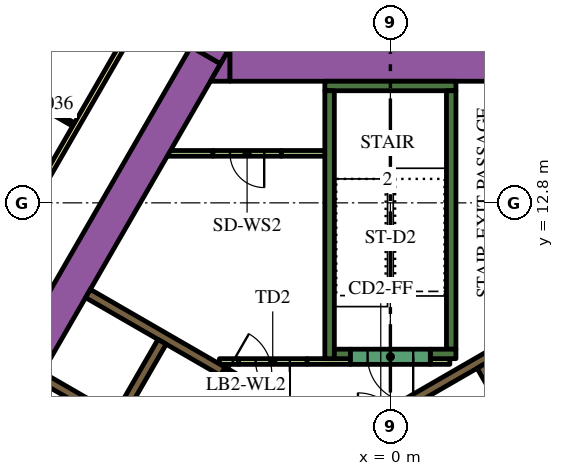
"""IFC4 building model, lengths in metres.
Left out: names, types, materials, properties, quantities, classifications, styles, units other than length and angle.
Written with IfcOpenShell. Run it as: python <this file> out.ifc"""

import sys

from ifc_helpers import new_model, si_unit, direction, frame, frame_2d, origin, place, context, subcontext, project, spatial, polyline, rectangle, outline, extrude, element, fill, save


model = new_model("IFC4")
c1 = context("Model", 3, precision=1e-05, world=origin(), true_north=direction((0.0, 1.0)))
c2 = subcontext(c1, "Body", "Model", "MODEL_VIEW")
j1 = project(units=[si_unit("LENGTHUNIT", "METRE"), si_unit("PLANEANGLEUNIT", "RADIAN")], contexts=[c1])
p1 = place(None, origin())
s1 = spatial("IfcSite", under=j1, at=p1, CompositionType="ELEMENT")
p2 = place(p1, origin())
s2 = spatial("IfcBuilding", under=s1, at=p2, CompositionType="ELEMENT")
p3 = place(p2, frame((0.0, 0.0, 66.6)))
s3 = spatial("IfcBuildingStorey", under=s2, at=p3, CompositionType="ELEMENT", Elevation=66.6)
p4 = place(p3, frame((-15.36, -1.503, 0.0), z_axis=(0.0, 0.0, 1.0), x_axis=(0.50000389221, 0.866023156604, 0.0)))
e1 = element("IfcWall", 1, at=p4, inside=s3, PredefinedType="SOLIDWALL", context=c2, shape_type="SweptSolid", body=[
    extrude(rectangle(XDim=21.0, YDim=0.9, at=frame_2d((10.5, 0.0))), origin(), (0.0, 0.0, 1.0), 3.9),
])
p5 = place(p3, origin())
e2 = element("IfcWall", 2, at=p5, inside=s3, PredefinedType="SOLIDWALL", context=c2, shape_type="SweptSolid", body=[
    extrude(outline(polyline([(-4.215, 16.9), (-4.469, 16.46), (-5.231, 16.9), (-4.215, 16.9)])), origin(), (0.0, 0.0, 1.0), 3.9),
])
p6 = place(p3, frame((-4.224, 16.45, 0.0), z_axis=(0.0, 0.0, 1.0), x_axis=(1.0, 0.0, 0.0)))
e3 = element("IfcWall", 3, at=p6, inside=s3, PredefinedType="SOLIDWALL", context=c2, shape_type="SweptSolid", body=[
    extrude(rectangle(XDim=9.488, YDim=0.9, at=frame_2d((4.744, 0.0))), origin(), (0.0, 0.0, 1.0), 3.9),
])
e4 = element("IfcWall", 4, at=p5, inside=s3, PredefinedType="SOLIDWALL", context=c2, shape_type="SweptSolid", body=[
    extrude(outline(polyline([(-4.734, 16.0), (-4.226, 16.88), (-4.226, 16.0), (-4.734, 16.0)])), origin(), (0.0, 0.0, 1.0), 3.9),
])
p7 = place(p3, frame((-1.725, 15.875, 0.0), z_axis=(0.0, 0.0, 1.0), x_axis=(1.0, 0.0, 0.0)))
e5 = element("IfcWall", 5, at=p7, inside=s3, PredefinedType="SOLIDWALL", context=c2, shape_type="SweptSolid", body=[
    extrude(rectangle(XDim=3.45, YDim=0.25, at=frame_2d((1.725, 0.0))), origin(), (0.0, 0.0, 1.0), 3.9),
])
p8 = place(p3, frame((1.6, 8.95, 0.0), z_axis=(0.0, 0.0, 1.0), x_axis=(0.0, 1.0, 0.0)))
e6 = element("IfcWall", 6, at=p8, inside=s3, PredefinedType="SOLIDWALL", context=c2, shape_type="SweptSolid", body=[
    extrude(rectangle(XDim=6.8, YDim=0.25, at=frame_2d((3.4, 0.0))), origin(), (0.0, 0.0, 1.0), 3.9),
])
p9 = place(p3, frame((1.05, 8.825, 0.0), z_axis=(0.0, 0.0, 1.0), x_axis=(1.0, 0.0, 0.0)))
e7 = element("IfcWall", 7, at=p9, inside=s3, PredefinedType="SOLIDWALL", context=c2, shape_type="SweptSolid", body=[
    extrude(rectangle(XDim=0.675, YDim=0.25, at=frame_2d((0.337, 0.0))), origin(), (0.0, 0.0, 1.0), 3.9),
])
p10 = place(p3, frame((-1.6, 8.7, 0.0), z_axis=(0.0, 0.0, 1.0), x_axis=(0.0, 1.0, 0.0)))
e8 = element("IfcWall", 8, at=p10, inside=s3, PredefinedType="SOLIDWALL", context=c2, shape_type="SweptSolid", body=[
    extrude(rectangle(XDim=7.05, YDim=0.25, at=frame_2d((3.525, 0.0))), origin(), (0.0, 0.0, 1.0), 3.9),
])
p11 = place(p3, frame((-1.475, 8.825, 0.0), z_axis=(0.0, 0.0, 1.0), x_axis=(1.0, 0.0, 0.0)))
e9 = element("IfcWall", 9, at=p11, inside=s3, PredefinedType="SOLIDWALL", context=c2, shape_type="SweptSolid", body=[
    extrude(rectangle(XDim=0.425, YDim=0.25, at=frame_2d((0.212, 0.0))), origin(), (0.0, 0.0, 1.0), 3.9),
])
p12 = place(p3, frame((0.098, 7.331, 0.0), z_axis=(0.0, 0.0, 1.0), x_axis=(0.865988154826, 0.50006451154, 0.0)))
e10 = element("IfcWall", 10, at=p12, inside=s3, PredefinedType="SOLIDWALL", context=c2, shape_type="SweptSolid", body=[
    extrude(rectangle(XDim=3.398, YDim=0.25, at=frame_2d((1.699, 0.0))), origin(), (0.0, 0.0, 1.0), 3.9),
])
e11 = element("IfcWall", 11, at=p5, inside=s3, PredefinedType="SOLIDWALL", context=c2, shape_type="SweptSolid", body=[
    extrude(outline(polyline([(-3.128, 7.481), (-3.259, 7.557), (-3.134, 7.773), (-3.003, 7.698), (-3.128, 7.481)])), origin(), (0.0, 0.0, 1.0), 3.9),
])
p13 = place(p3, frame((-7.314, 7.132, 0.0), z_axis=(0.0, 0.0, 1.0), x_axis=(-0.866008176907, 0.50002983664, 0.0)))
e12 = element("IfcWall", 12, at=p13, inside=s3, PredefinedType="SOLIDWALL", context=c2, shape_type="SweptSolid", body=[
    extrude(rectangle(XDim=2.2, YDim=0.25, at=frame_2d((1.1, 0.0))), origin(), (0.0, 0.0, 1.0), 3.9),
])
p14 = place(p3, frame((-7.959, 10.415, 0.0), z_axis=(0.0, 0.0, 1.0), x_axis=(0.866020958405, -0.500007699544, 0.0)))
e13 = element("IfcWall", 13, at=p14, inside=s3, PredefinedType="SOLIDWALL", context=c2, shape_type="SweptSolid", body=[
    extrude(rectangle(XDim=4.1, YDim=0.25, at=frame_2d((2.05, 0.0))), origin(), (0.0, 0.0, 1.0), 3.9),
])
p15 = place(p3, frame((-3.997, 8.625, 0.0), z_axis=(0.0, 0.0, 1.0), x_axis=(-1.0, 0.0, 0.0)))
e14 = element("IfcWall", 14, at=p15, inside=s3, PredefinedType="PARTITIONING", context=c2, shape_type="SweptSolid", body=[
    extrude(rectangle(XDim=0.502, YDim=0.15, at=frame_2d((0.251, 0.0))), origin(), (0.0, 0.0, 1.0), 2.75),
])
p16 = place(p3, frame((-5.851, 14.102, 0.0), z_axis=(0.0, 0.0, 1.0), x_axis=(1.0, 0.0, 0.0)))
e15 = element("IfcWall", 15, at=p16, inside=s3, PredefinedType="PARTITIONING", context=c2, shape_type="SweptSolid", body=[
    extrude(rectangle(XDim=1.18, YDim=0.15, at=frame_2d((0.59, 0.0))), origin(), (0.0, 0.0, 1.0), 2.75),
])
p17 = place(p3, frame((-2.871, 14.102, 0.0), z_axis=(0.0, 0.0, 1.0), x_axis=(1.0, 0.0, 0.0)))
e16 = element("IfcWall", 16, at=p17, inside=s3, PredefinedType="PARTITIONING", context=c2, shape_type="SweptSolid", body=[
    extrude(rectangle(XDim=1.196, YDim=0.15, at=frame_2d((0.598, 0.0))), origin(), (0.0, 0.0, 1.0), 2.75),
])
p18 = place(p3, frame((-2.196, 8.625, 0.0), z_axis=(0.0, 0.0, 1.0), x_axis=(1.0, 0.0, 0.0)))
e17 = element("IfcWall", 17, at=p18, inside=s3, PredefinedType="PARTITIONING", context=c2, shape_type="SweptSolid", body=[
    extrude(rectangle(XDim=1.146, YDim=0.15, at=frame_2d((0.573, 0.0))), origin(), (0.0, 0.0, 1.0), 2.75),
])
p19 = place(p3, frame((1.05, 8.625, 0.0), z_axis=(0.0, 0.0, 1.0), x_axis=(1.0, 0.0, 0.0)))
e18 = element("IfcWall", 18, at=p19, inside=s3, PredefinedType="PARTITIONING", context=c2, shape_type="SweptSolid", body=[
    extrude(rectangle(XDim=0.514, YDim=0.15, at=frame_2d((0.257, 0.0))), origin(), (0.0, 0.0, 1.0), 2.75),
])
p20 = place(p3, frame((8.565, -2.185, 0.0), z_axis=(0.0, 0.0, 1.0), x_axis=(-0.499997954832, 0.866026584559, 0.0)))
e19 = element("IfcWall", 19, at=p20, inside=s3, PredefinedType="SOLIDWALL", context=c2, shape_type="SweptSolid", body=[
    extrude(rectangle(XDim=12.35, YDim=0.25, at=frame_2d((6.175, 0.0))), origin(), (0.0, 0.0, 1.0), 3.9),
])
p21 = place(p20, frame((5.725, 0.0, 0.0)))
e20 = element("IfcOpeningElement", 20, at=p21, cuts=e19, PredefinedType="OPENING", context=c2, shape_type="SweptSolid", body=[
    extrude(rectangle(XDim=0.9, YDim=2.1, at=frame_2d((0.45, 1.05))), frame((0.0, 0.135, 0.0), z_axis=(0.0, -1.0, 0.0), x_axis=(1.0, 0.0, 0.0)), (0.0, 0.0, 1.0), 0.27),
])
p22 = place(p3, frame((-6.008, 9.144, 0.0), z_axis=(0.0, 0.0, 1.0), x_axis=(-0.500006956611, -0.866021387346, 0.0)))
e21 = element("IfcWall", 21, at=p22, inside=s3, PredefinedType="SOLIDWALL", context=c2, shape_type="SweptSolid", body=[
    extrude(rectangle(XDim=9.83, YDim=0.25, at=frame_2d((4.915, 0.0))), origin(), (0.0, 0.0, 1.0), 3.9),
])
p23 = place(p22, frame((6.985, 0.0, 0.0)))
e22 = element("IfcOpeningElement", 22, at=p23, cuts=e21, PredefinedType="OPENING", context=c2, shape_type="SweptSolid", body=[
    extrude(rectangle(XDim=0.9, YDim=2.1, at=frame_2d((0.45, 1.05))), frame((0.0, 0.135, 0.0), z_axis=(0.0, -1.0, 0.0), x_axis=(1.0, 0.0, 0.0)), (0.0, 0.0, 1.0), 0.27),
])
p24 = place(p3, frame((1.05, 8.75, 0.0), z_axis=(0.0, 0.0, 1.0), x_axis=(-1.0, 0.0, 0.0)))
e23 = element("IfcWall", 23, at=p24, inside=s3, PredefinedType="SOLIDWALL", context=c2, shape_type="SweptSolid", body=[
    extrude(rectangle(XDim=2.1, YDim=0.4, at=frame_2d((1.05, 0.0))), origin(), (0.0, 0.0, 1.0), 3.9),
])
p25 = place(p24, frame((0.45, 0.0, 0.0)))
e24 = element("IfcOpeningElement", 24, at=p25, cuts=e23, PredefinedType="OPENING", context=c2, shape_type="SweptSolid", body=[
    extrude(rectangle(XDim=1.2, YDim=2.1, at=frame_2d((0.6, 1.05))), frame((0.0, 0.21, 0.0), z_axis=(0.0, -1.0, 0.0), x_axis=(1.0, 0.0, 0.0)), (0.0, 0.0, 1.0), 0.42),
])
p26 = place(p3, frame((-2.196, 8.625, 0.0), z_axis=(0.0, 0.0, 1.0), x_axis=(-1.0, 0.0, 0.0)))
e25 = element("IfcWall", 25, at=p26, inside=s3, PredefinedType="PARTITIONING", context=c2, shape_type="SweptSolid", body=[
    extrude(rectangle(XDim=1.8, YDim=0.15, at=frame_2d((0.9, 0.0))), origin(), (0.0, 0.0, 1.0), 2.75),
])
p27 = place(p26, frame((0.45, 0.0, 0.0)))
e26 = element("IfcOpeningElement", 26, at=p27, cuts=e25, PredefinedType="OPENING", context=c2, shape_type="SweptSolid", body=[
    extrude(rectangle(XDim=0.9, YDim=2.1, at=frame_2d((0.45, 1.05))), frame((0.0, 0.085, 0.0), z_axis=(0.0, -1.0, 0.0), x_axis=(1.0, 0.0, 0.0)), (0.0, 0.0, 1.0), 0.17),
])
p28 = place(p3, frame((-4.409, 8.365, 0.0), z_axis=(0.0, 0.0, 1.0), x_axis=(0.866034573852, -0.49998411664, 0.0)))
e27 = element("IfcWall", 27, at=p28, inside=s3, PredefinedType="SOLIDWALL", context=c2, shape_type="SweptSolid", body=[
    extrude(rectangle(XDim=1.4, YDim=0.25, at=frame_2d((0.7, 0.0))), origin(), (0.0, 0.0, 1.0), 3.9),
])
p29 = place(p28, frame((0.1, 0.0, 0.0)))
e28 = element("IfcOpeningElement", 28, at=p29, cuts=e27, PredefinedType="OPENING", context=c2, shape_type="SweptSolid", body=[
    extrude(rectangle(XDim=1.2, YDim=2.1, at=frame_2d((0.6, 1.05))), frame((0.0, 0.135, 0.0), z_axis=(0.0, -1.0, 0.0), x_axis=(1.0, 0.0, 0.0)), (0.0, 0.0, 1.0), 0.27),
])
p30 = place(p3, frame((-2.871, 14.102, 0.0), z_axis=(0.0, 0.0, 1.0), x_axis=(-1.0, 0.0, 0.0)))
e29 = element("IfcWall", 29, at=p30, inside=s3, PredefinedType="PARTITIONING", context=c2, shape_type="SweptSolid", body=[
    extrude(rectangle(XDim=1.8, YDim=0.15, at=frame_2d((0.9, 0.0))), origin(), (0.0, 0.0, 1.0), 2.75),
])
p31 = place(p30, frame((0.45, 0.0, 0.0)))
e30 = element("IfcOpeningElement", 30, at=p31, cuts=e29, PredefinedType="OPENING", context=c2, shape_type="SweptSolid", body=[
    extrude(rectangle(XDim=0.9, YDim=2.1, at=frame_2d((0.45, 1.05))), frame((0.0, 0.085, 0.0), z_axis=(0.0, -1.0, 0.0), x_axis=(1.0, 0.0, 0.0)), (0.0, 0.0, 1.0), 0.17),
])
p32 = place(p3, frame((-19.081, -3.9, 0.0), z_axis=(0.0, 0.0, 1.0), x_axis=(0.499998313975, 0.866026377209, 0.0)))
e31 = element("IfcWall", 31, at=p32, inside=s3, PredefinedType="PARTITIONING", context=c2, shape_type="SweptSolid", body=[
    extrude(rectangle(XDim=25.766, YDim=0.15, at=frame_2d((12.883, 0.0))), origin(), (0.0, 0.0, 1.0), 2.75),
])
p33 = place(p32, frame((24.586, 0.0, 0.0)))
e32 = element("IfcOpeningElement", 32, at=p33, cuts=e31, PredefinedType="OPENING", context=c2, shape_type="SweptSolid", body=[
    extrude(rectangle(XDim=1.0, YDim=2.1, at=frame_2d((0.5, 1.05))), frame((0.0, 0.085, 0.0), z_axis=(0.0, -1.0, 0.0), x_axis=(1.0, 0.0, 0.0)), (0.0, 0.0, 1.0), 0.17),
])
p34 = place(p32, frame((9.948, 0.0, 0.0)))
e33 = element("IfcOpeningElement", 33, at=p34, cuts=e31, PredefinedType="OPENING", context=c2, shape_type="SweptSolid", body=[
    extrude(rectangle(XDim=1.0, YDim=2.1, at=frame_2d((0.5, 1.05))), frame((0.0, 0.085, 0.0), z_axis=(0.0, -1.0, 0.0), x_axis=(1.0, 0.0, 0.0)), (0.0, 0.0, 1.0), 0.17),
])
p35 = place(p32, frame((7.782, 0.0, 0.0)))
e34 = element("IfcOpeningElement", 34, at=p35, cuts=e31, PredefinedType="OPENING", context=c2, shape_type="SweptSolid", body=[
    extrude(rectangle(XDim=0.9, YDim=2.1, at=frame_2d((0.45, 1.05))), frame((0.0, 0.085, 0.0), z_axis=(0.0, -1.0, 0.0), x_axis=(1.0, 0.0, 0.0)), (0.0, 0.0, 1.0), 0.17),
])
p36 = place(p32, frame((4.658, 0.0, 0.0)))
e35 = element("IfcOpeningElement", 35, at=p36, cuts=e31, PredefinedType="OPENING", context=c2, shape_type="SweptSolid", body=[
    extrude(rectangle(XDim=0.9, YDim=2.1, at=frame_2d((0.45, 1.05))), frame((0.0, 0.085, 0.0), z_axis=(0.0, -1.0, 0.0), x_axis=(1.0, 0.0, 0.0)), (0.0, 0.0, 1.0), 0.17),
])
p37 = place(p3, frame((-8.337, 14.861, 0.0), z_axis=(0.0, 0.0, 1.0), x_axis=(-0.866034573852, 0.49998411664, 0.0)))
e36 = element("IfcWall", 36, at=p37, inside=s3, PredefinedType="PARTITIONING", context=c2, shape_type="SweptSolid", body=[
    extrude(rectangle(XDim=2.8, YDim=0.1, at=frame_2d((1.4, 0.0))), origin(), (0.0, 0.0, 1.0), 2.75),
])
p38 = place(p37, frame((0.6, 0.0, 0.0)))
e37 = element("IfcOpeningElement", 37, at=p38, cuts=e36, PredefinedType="OPENING", context=c2, shape_type="SweptSolid", body=[
    extrude(rectangle(XDim=0.9, YDim=2.1, at=frame_2d((0.45, 1.05))), frame((0.0, 0.06, 0.0), z_axis=(0.0, -1.0, 0.0), x_axis=(1.0, 0.0, 0.0)), (0.0, 0.0, 1.0), 0.12),
])
p39 = place(p25, origin())
e38 = element("IfcDoor", 38, at=p39, inside=s3, OperationType="SINGLE_SWING_LEFT", PredefinedType="DOOR", context=c2, shape_type="SweptSolid", body=[
    extrude(rectangle(XDim=1.2, YDim=2.1, at=frame_2d((0.6, 1.05))), frame((0.0, 0.025, 0.0), z_axis=(0.0, -1.0, 0.0), x_axis=(1.0, 0.0, 0.0)), (0.0, 0.0, 1.0), 0.05),
])
fill(e24, e38)
p40 = place(p27, origin())
e39 = element("IfcDoor", 39, at=p40, inside=s3, OperationType="SINGLE_SWING_LEFT", PredefinedType="DOOR", context=c2, shape_type="SweptSolid", body=[
    extrude(rectangle(XDim=0.9, YDim=2.1, at=frame_2d((0.45, 1.05))), frame((0.0, 0.025, 0.0), z_axis=(0.0, -1.0, 0.0), x_axis=(1.0, 0.0, 0.0)), (0.0, 0.0, 1.0), 0.05),
])
fill(e26, e39)
p41 = place(p29, origin())
e40 = element("IfcDoor", 40, at=p41, inside=s3, OperationType="SINGLE_SWING_LEFT", PredefinedType="DOOR", context=c2, shape_type="SweptSolid", body=[
    extrude(rectangle(XDim=1.2, YDim=2.1, at=frame_2d((0.6, 1.05))), frame((0.0, 0.025, 0.0), z_axis=(0.0, -1.0, 0.0), x_axis=(1.0, 0.0, 0.0)), (0.0, 0.0, 1.0), 0.05),
])
fill(e28, e40)
p42 = place(p31, origin())
e41 = element("IfcDoor", 41, at=p42, inside=s3, OperationType="SINGLE_SWING_LEFT", PredefinedType="DOOR", context=c2, shape_type="SweptSolid", body=[
    extrude(rectangle(XDim=0.9, YDim=2.1, at=frame_2d((0.45, 1.05))), frame((0.0, 0.025, 0.0), z_axis=(0.0, -1.0, 0.0), x_axis=(1.0, 0.0, 0.0)), (0.0, 0.0, 1.0), 0.05),
])
fill(e30, e41)
p43 = place(p38, origin())
e42 = element("IfcDoor", 42, at=p43, inside=s3, OperationType="SINGLE_SWING_RIGHT", PredefinedType="DOOR", context=c2, shape_type="SweptSolid", body=[
    extrude(rectangle(XDim=0.9, YDim=2.1, at=frame_2d((0.45, 1.05))), frame((0.0, 0.025, 0.0), z_axis=(0.0, -1.0, 0.0), x_axis=(1.0, 0.0, 0.0)), (0.0, 0.0, 1.0), 0.05),
])
fill(e37, e42)
save(model, sys.argv[1])
